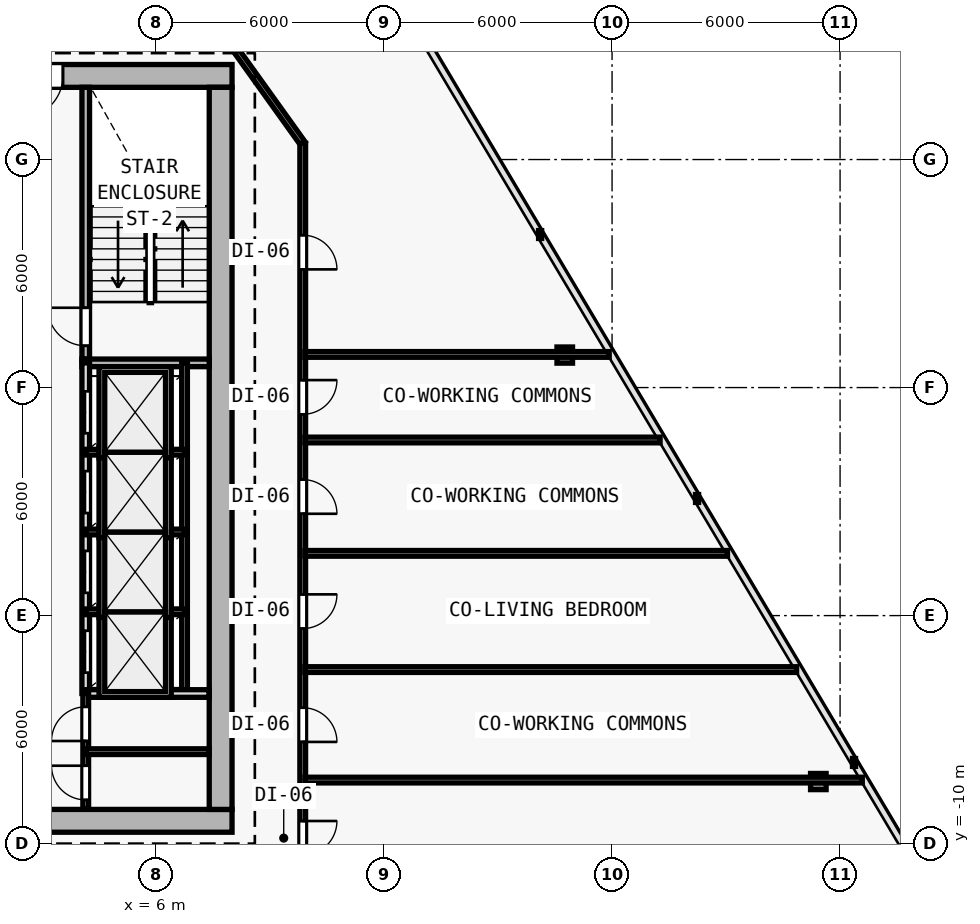
"""IFC4 building model, lengths in metres.
Left out: names, types, materials, properties, quantities, classifications, styles, units other than length and angle.
Written with IfcOpenShell. Run it as: python <this file> out.ifc"""

import sys

from ifc_helpers import new_model, si_unit, direction, frame, frame_2d, origin, origin_2d, place, context, subcontext, project, spatial, rectangle, i_section, extrude, element, fill, save


model = new_model("IFC4")
c1 = context("Model", 3, precision=1e-05, world=origin(), true_north=direction((0.0, 1.0)))
c2 = subcontext(c1, "Body", "Model", "MODEL_VIEW")
j1 = project(units=[si_unit("LENGTHUNIT", "METRE"), si_unit("PLANEANGLEUNIT", "RADIAN")], contexts=[c1])
p1 = place(None, origin())
s1 = spatial("IfcSite", under=j1, at=p1, CompositionType="ELEMENT")
p2 = place(p1, origin())
s2 = spatial("IfcBuilding", under=s1, at=p2, CompositionType="ELEMENT")
p3 = place(p2, frame((0.0, 0.0, 96.9)))
s3 = spatial("IfcBuildingStorey", under=s2, at=p3, CompositionType="ELEMENT", Elevation=96.9)
for number, where, z_axis, x_axis in (
    (1, (7.7, -9.4, 0.0), (0.0, 0.0, 1.0), (1.0, 0.0, 0.0)),
    (2, (7.7, 10.2, 0.0), (0.0, 0.0, 1.0), (1.0, 0.0, 0.0)),
    (3, (7.7, 0.4, 0.0), (0.0, 0.0, 1.0), (1.0, 0.0, 0.0)),
):
    element("IfcColumn", number, at=place(p3, frame(where, z_axis=z_axis, x_axis=x_axis)), inside=s3, PredefinedType="COLUMN", context=c2, shape_type="SweptSolid", body=[
        extrude(i_section(OverallWidth=0.409, OverallDepth=0.425, WebThickness=0.021, FlangeThickness=0.034, FilletRadius=0.015, at=origin_2d()), origin(), (0.0, 0.0, 1.0), 3.6),
    ])
p4 = place(p3, frame((23.428, -8.366, 0.006), z_axis=(-0.026107436898, 0.021620221181, 0.999425318758), x_axis=(-0.637813971185, -0.770190455771, 0.0)))
e4 = element("IfcColumn", 4, at=p4, inside=s3, PredefinedType="COLUMN", context=c2, shape_type="SweptSolid", body=[
    extrude(i_section(OverallWidth=0.409, OverallDepth=0.425, WebThickness=0.021, FlangeThickness=0.034, FilletRadius=0.015, at=origin_2d()), origin(), (0.0, 0.0, 1.0), 3.591),
])
p5 = place(p3, frame((16.755, 2.855, 0.006), z_axis=(-0.018907326549, 0.00952167524, 0.999775900241), x_axis=(-0.449781931574, -0.893138406984, 0.0)))
e5 = element("IfcColumn", 5, at=p5, inside=s3, PredefinedType="COLUMN", context=c2, shape_type="SweptSolid", body=[
    extrude(i_section(OverallWidth=0.409, OverallDepth=0.425, WebThickness=0.021, FlangeThickness=0.034, FilletRadius=0.015, at=origin_2d()), origin(), (0.0, 0.0, 1.0), 3.59),
])
p6 = place(p3, frame((-8.0, -9.4, 0.0), z_axis=(0.0, 0.0, 1.0), x_axis=(1.0, 0.0, 0.0)))
e6 = element("IfcWall", 6, at=p6, inside=s3, PredefinedType="SHEAR", context=c2, shape_type="SweptSolid", body=[
    extrude(rectangle(XDim=16.0, YDim=0.6, at=frame_2d((8.0, 0.0))), origin(), (0.0, 0.0, 1.0), 3.35),
])
p7 = place(p6, frame((9.65, 0.0, 0.0)))
e7 = element("IfcOpeningElement", 7, at=p7, cuts=e6, PredefinedType="OPENING", context=c2, shape_type="SweptSolid", body=[
    extrude(rectangle(XDim=1.5, YDim=2.2, at=frame_2d((0.75, 1.1))), frame((0.0, 0.31, 0.0), z_axis=(0.0, -1.0, 0.0), x_axis=(1.0, 0.0, 0.0)), (0.0, 0.0, 1.0), 0.62),
])
p8 = place(p3, frame((8.0, 10.2, 0.0), z_axis=(0.0, 0.0, 1.0), x_axis=(-1.0, 0.0, 0.0)))
e8 = element("IfcWall", 8, at=p8, inside=s3, PredefinedType="SHEAR", context=c2, shape_type="SweptSolid", body=[
    extrude(rectangle(XDim=16.0, YDim=0.6, at=frame_2d((8.0, 0.0))), origin(), (0.0, 0.0, 1.0), 3.35),
])
p9 = place(p8, frame((4.45, 0.0, 0.0)))
e9 = element("IfcOpeningElement", 9, at=p9, cuts=e8, PredefinedType="OPENING", context=c2, shape_type="SweptSolid", body=[
    extrude(rectangle(XDim=1.1, YDim=2.15, at=frame_2d((0.55, 1.075))), frame((0.0, 0.31, 0.0), z_axis=(0.0, -1.0, 0.0), x_axis=(1.0, 0.0, 0.0)), (0.0, 0.0, 1.0), 0.62),
])
p10 = place(p3, frame((7.7, 9.9, 0.0), z_axis=(0.0, 0.0, 1.0), x_axis=(0.0, -1.0, 0.0)))
e10 = element("IfcWall", 10, at=p10, inside=s3, PredefinedType="SHEAR", context=c2, shape_type="SweptSolid", body=[
    extrude(rectangle(XDim=19.0, YDim=0.6, at=frame_2d((9.5, 0.0))), origin(), (0.0, 0.0, 1.0), 3.35),
])
p11 = place(p3, frame((4.15, 2.75, 0.0), z_axis=(0.0, 0.0, 1.0), x_axis=(0.0, 1.0, 0.0)))
e11 = element("IfcWall", 11, at=p11, inside=s3, PredefinedType="SOLIDWALL", context=c2, shape_type="SweptSolid", body=[
    extrude(rectangle(XDim=7.15, YDim=0.2, at=frame_2d((3.575, 0.0))), origin(), (0.0, 0.0, 1.0), 3.35),
])
p12 = place(p11, frame((0.35, 0.0, 0.0)))
e12 = element("IfcOpeningElement", 12, at=p12, cuts=e11, PredefinedType="OPENING", context=c2, shape_type="SweptSolid", body=[
    extrude(rectangle(XDim=1.0, YDim=2.15, at=frame_2d((0.5, 1.075))), frame((0.0, 0.11, 0.0), z_axis=(0.0, -1.0, 0.0), x_axis=(1.0, 0.0, 0.0)), (0.0, 0.0, 1.0), 0.22),
])
p13 = place(p3, frame((4.05, 2.65, 0.0), z_axis=(0.0, 0.0, 1.0), x_axis=(1.0, 0.0, 0.0)))
e13 = element("IfcWall", 13, at=p13, inside=s3, PredefinedType="SOLIDWALL", context=c2, shape_type="SweptSolid", body=[
    extrude(rectangle(XDim=3.35, YDim=0.2, at=frame_2d((1.675, 0.0))), origin(), (0.0, 0.0, 1.0), 3.35),
])
p14 = place(p3, frame((4.15, -6.05, 0.0), z_axis=(0.0, 0.0, 1.0), x_axis=(0.0, 1.0, 0.0)))
e14 = element("IfcWall", 14, at=p14, inside=s3, PredefinedType="SOLIDWALL", context=c2, shape_type="SweptSolid", body=[
    extrude(rectangle(XDim=8.7, YDim=0.2, at=frame_2d((4.35, 0.0))), origin(), (0.0, 0.0, 1.0), 3.35),
])
p15 = place(p14, frame((0.55, 0.0, 0.0)))
e15 = element("IfcOpeningElement", 15, at=p15, cuts=e14, PredefinedType="OPENING", context=c2, shape_type="SweptSolid", body=[
    extrude(rectangle(XDim=1.1, YDim=2.15, at=frame_2d((0.55, 1.075))), frame((0.0, 0.11, 0.0), z_axis=(0.0, -1.0, 0.0), x_axis=(1.0, 0.0, 0.0)), (0.0, 0.0, 1.0), 0.22),
])
p16 = place(p14, frame((2.65, 0.0, 0.0)))
e16 = element("IfcOpeningElement", 16, at=p16, cuts=e14, PredefinedType="OPENING", context=c2, shape_type="SweptSolid", body=[
    extrude(rectangle(XDim=1.1, YDim=2.15, at=frame_2d((0.55, 1.075))), frame((0.0, 0.11, 0.0), z_axis=(0.0, -1.0, 0.0), x_axis=(1.0, 0.0, 0.0)), (0.0, 0.0, 1.0), 0.22),
])
p17 = place(p14, frame((4.75, 0.0, 0.0)))
e17 = element("IfcOpeningElement", 17, at=p17, cuts=e14, PredefinedType="OPENING", context=c2, shape_type="SweptSolid", body=[
    extrude(rectangle(XDim=1.1, YDim=2.15, at=frame_2d((0.55, 1.075))), frame((0.0, 0.11, 0.0), z_axis=(0.0, -1.0, 0.0), x_axis=(1.0, 0.0, 0.0)), (0.0, 0.0, 1.0), 0.22),
])
p18 = place(p14, frame((6.85, 0.0, 0.0)))
e18 = element("IfcOpeningElement", 18, at=p18, cuts=e14, PredefinedType="OPENING", context=c2, shape_type="SweptSolid", body=[
    extrude(rectangle(XDim=1.1, YDim=2.15, at=frame_2d((0.55, 1.075))), frame((0.0, 0.11, 0.0), z_axis=(0.0, -1.0, 0.0), x_axis=(1.0, 0.0, 0.0)), (0.0, 0.0, 1.0), 0.22),
])
p19 = place(p3, frame((6.75, -6.05, 0.0), z_axis=(0.0, 0.0, 1.0), x_axis=(0.0, 1.0, 0.0)))
e19 = element("IfcWall", 19, at=p19, inside=s3, PredefinedType="PARTITIONING", context=c2, shape_type="SweptSolid", body=[
    extrude(rectangle(XDim=8.7, YDim=0.15, at=frame_2d((4.35, 0.0))), origin(), (0.0, 0.0, 1.0), 3.35),
])
for number, where, z_axis, x_axis in (
    (20, (4.15, -3.9, 0.0), (0.0, 0.0, 1.0), (1.0, 0.0, 0.0)),
    (21, (4.15, -1.8, 0.0), (0.0, 0.0, 1.0), (1.0, 0.0, 0.0)),
    (22, (4.15, 0.3, 0.0), (0.0, 0.0, 1.0), (1.0, 0.0, 0.0)),
):
    element("IfcWall", number, at=place(p3, frame(where, z_axis=z_axis, x_axis=x_axis)), inside=s3, PredefinedType="PARTITIONING", context=c2, shape_type="SweptSolid", body=[
        extrude(rectangle(XDim=2.6, YDim=0.15, at=frame_2d((1.3, 0.0))), origin(), (0.0, 0.0, 1.0), 3.35),
    ])
p20 = place(p3, frame((4.15, -6.05, 0.0), z_axis=(0.0, 0.0, 1.0), x_axis=(1.0, 0.0, 0.0)))
e23 = element("IfcWall", 23, at=p20, inside=s3, PredefinedType="SOLIDWALL", context=c2, shape_type="SweptSolid", body=[
    extrude(rectangle(XDim=3.245, YDim=0.2, at=frame_2d((1.623, 0.0))), origin(), (0.0, 0.0, 1.0), 3.35),
])
p21 = place(p3, frame((4.15, -9.095, 0.0), z_axis=(0.0, 0.0, 1.0), x_axis=(0.0, 1.0, 0.0)))
e24 = element("IfcWall", 24, at=p21, inside=s3, PredefinedType="PARTITIONING", context=c2, shape_type="SweptSolid", body=[
    extrude(rectangle(XDim=3.045, YDim=0.15, at=frame_2d((1.522, 0.0))), origin(), (0.0, 0.0, 1.0), 3.35),
])
p22 = place(p21, frame((0.245, 0.0, 0.0)))
e25 = element("IfcOpeningElement", 25, at=p22, cuts=e24, PredefinedType="OPENING", context=c2, shape_type="SweptSolid", body=[
    extrude(rectangle(XDim=0.9, YDim=2.1, at=frame_2d((0.45, 1.05))), frame((0.0, 0.085, 0.0), z_axis=(0.0, -1.0, 0.0), x_axis=(1.0, 0.0, 0.0)), (0.0, 0.0, 1.0), 0.17),
])
p23 = place(p21, frame((1.795, 0.0, 0.0)))
e26 = element("IfcOpeningElement", 26, at=p23, cuts=e24, PredefinedType="OPENING", context=c2, shape_type="SweptSolid", body=[
    extrude(rectangle(XDim=0.9, YDim=2.1, at=frame_2d((0.45, 1.05))), frame((0.0, 0.085, 0.0), z_axis=(0.0, -1.0, 0.0), x_axis=(1.0, 0.0, 0.0)), (0.0, 0.0, 1.0), 0.17),
])
p24 = place(p3, frame((4.15, -7.58, 0.0), z_axis=(0.0, 0.0, 1.0), x_axis=(1.0, 0.0, 0.0)))
e27 = element("IfcWall", 27, at=p24, inside=s3, PredefinedType="PARTITIONING", context=c2, shape_type="SweptSolid", body=[
    extrude(rectangle(XDim=3.245, YDim=0.15, at=frame_2d((1.623, 0.0))), origin(), (0.0, 0.0, 1.0), 3.35),
])
p25 = place(p3, frame((7.041, 12.36, 0.0), z_axis=(0.0, 0.0, 1.0), x_axis=(0.582449511476, -0.812866881218, 0.0)))
e28 = element("IfcWall", 28, at=p25, inside=s3, PredefinedType="PARTITIONING", context=c2, shape_type="SweptSolid", body=[
    extrude(rectangle(XDim=4.84, YDim=0.15, at=frame_2d((2.42, 0.0))), origin(), (0.0, 0.0, 1.0), 2.925),
])
p26 = place(p3, frame((9.86, 8.426, 0.0), z_axis=(0.0, 0.0, 1.0), x_axis=(0.0, -1.0, 0.0)))
e29 = element("IfcWall", 29, at=p26, inside=s3, PredefinedType="PARTITIONING", context=c2, shape_type="SweptSolid", body=[
    extrude(rectangle(XDim=19.986, YDim=0.15, at=frame_2d((9.993, 0.0))), origin(), (0.0, 0.0, 1.0), 2.705),
])
p27 = place(p26, frame((17.83, 0.0, 0.0)))
e30 = element("IfcOpeningElement", 30, at=p27, cuts=e29, PredefinedType="OPENING", context=c2, shape_type="SweptSolid", body=[
    extrude(rectangle(XDim=0.9, YDim=2.1, at=frame_2d((0.45, 1.05))), frame((0.0, 0.085, 0.0), z_axis=(0.0, -1.0, 0.0), x_axis=(1.0, 0.0, 0.0)), (0.0, 0.0, 1.0), 0.17),
])
p28 = place(p26, frame((14.85, 0.0, 0.0)))
e31 = element("IfcOpeningElement", 31, at=p28, cuts=e29, PredefinedType="OPENING", context=c2, shape_type="SweptSolid", body=[
    extrude(rectangle(XDim=0.9, YDim=2.1, at=frame_2d((0.45, 1.05))), frame((0.0, 0.085, 0.0), z_axis=(0.0, -1.0, 0.0), x_axis=(1.0, 0.0, 0.0)), (0.0, 0.0, 1.0), 0.17),
])
p29 = place(p26, frame((11.867, 0.0, 0.0)))
e32 = element("IfcOpeningElement", 32, at=p29, cuts=e29, PredefinedType="OPENING", context=c2, shape_type="SweptSolid", body=[
    extrude(rectangle(XDim=0.9, YDim=2.1, at=frame_2d((0.45, 1.05))), frame((0.0, 0.085, 0.0), z_axis=(0.0, -1.0, 0.0), x_axis=(1.0, 0.0, 0.0)), (0.0, 0.0, 1.0), 0.17),
])
p30 = place(p26, frame((8.846, 0.0, 0.0)))
e33 = element("IfcOpeningElement", 33, at=p30, cuts=e29, PredefinedType="OPENING", context=c2, shape_type="SweptSolid", body=[
    extrude(rectangle(XDim=0.9, YDim=2.1, at=frame_2d((0.45, 1.05))), frame((0.0, 0.085, 0.0), z_axis=(0.0, -1.0, 0.0), x_axis=(1.0, 0.0, 0.0)), (0.0, 0.0, 1.0), 0.17),
])
p31 = place(p26, frame((6.229, 0.0, 0.0)))
e34 = element("IfcOpeningElement", 34, at=p31, cuts=e29, PredefinedType="OPENING", context=c2, shape_type="SweptSolid", body=[
    extrude(rectangle(XDim=0.9, YDim=2.1, at=frame_2d((0.45, 1.05))), frame((0.0, 0.085, 0.0), z_axis=(0.0, -1.0, 0.0), x_axis=(1.0, 0.0, 0.0)), (0.0, 0.0, 1.0), 0.17),
])
p32 = place(p26, frame((2.416, 0.0, 0.0)))
e35 = element("IfcOpeningElement", 35, at=p32, cuts=e29, PredefinedType="OPENING", context=c2, shape_type="SweptSolid", body=[
    extrude(rectangle(XDim=0.9, YDim=2.1, at=frame_2d((0.45, 1.05))), frame((0.0, 0.085, 0.0), z_axis=(0.0, -1.0, 0.0), x_axis=(1.0, 0.0, 0.0)), (0.0, 0.0, 1.0), 0.17),
])
p33 = place(p3, frame((9.92, -8.328, 0.0), z_axis=(0.0, 0.0, 1.0), x_axis=(1.0, 0.0, 0.0)))
e36 = element("IfcWall", 36, at=p33, inside=s3, PredefinedType="PARTITIONING", context=c2, shape_type="SweptSolid", body=[
    extrude(rectangle(XDim=14.664, YDim=0.15, at=frame_2d((7.332, 0.0))), origin(), (0.0, 0.0, 1.0), 2.705),
])
p34 = place(p3, frame((9.92, 2.872, 0.0), z_axis=(0.0, 0.0, 1.0), x_axis=(1.0, 0.0, 0.0)))
e37 = element("IfcWall", 37, at=p34, inside=s3, PredefinedType="PARTITIONING", context=c2, shape_type="SweptSolid", body=[
    extrude(rectangle(XDim=8.005, YDim=0.15, at=frame_2d((4.002, 0.0))), origin(), (0.0, 0.0, 1.0), 2.835),
])
p35 = place(p3, frame((9.92, -2.362, 0.0), z_axis=(0.0, 0.0, 1.0), x_axis=(1.0, 0.0, 0.0)))
e38 = element("IfcWall", 38, at=p35, inside=s3, PredefinedType="PARTITIONING", context=c2, shape_type="SweptSolid", body=[
    extrude(rectangle(XDim=11.117, YDim=0.15, at=frame_2d((5.559, 0.0))), origin(), (0.0, 0.0, 1.0), 2.835),
])
p36 = place(p3, frame((9.92, -5.42, 0.0), z_axis=(0.0, 0.0, 1.0), x_axis=(1.0, 0.0, 0.0)))
e39 = element("IfcWall", 39, at=p36, inside=s3, PredefinedType="PARTITIONING", context=c2, shape_type="SweptSolid", body=[
    extrude(rectangle(XDim=12.936, YDim=0.15, at=frame_2d((6.468, 0.0))), origin(), (0.0, 0.0, 1.0), 2.835),
])
p37 = place(p3, frame((9.92, 0.621, 0.0), z_axis=(0.0, 0.0, 1.0), x_axis=(1.0, 0.0, 0.0)))
e40 = element("IfcWall", 40, at=p37, inside=s3, PredefinedType="PARTITIONING", context=c2, shape_type="SweptSolid", body=[
    extrude(rectangle(XDim=9.344, YDim=0.15, at=frame_2d((4.672, 0.0))), origin(), (0.0, 0.0, 1.0), 2.835),
])
p38 = place(p9, origin())
e41 = element("IfcDoor", 41, at=p38, inside=s3, OperationType="SINGLE_SWING_RIGHT", PredefinedType="DOOR", context=c2, shape_type="SweptSolid", body=[
    extrude(rectangle(XDim=1.1, YDim=2.15, at=frame_2d((0.55, 1.075))), frame((0.0, 0.025, 0.0), z_axis=(0.0, -1.0, 0.0), x_axis=(1.0, 0.0, 0.0)), (0.0, 0.0, 1.0), 0.05),
])
fill(e9, e41)
p39 = place(p12, origin())
e42 = element("IfcDoor", 42, at=p39, inside=s3, OperationType="SINGLE_SWING_RIGHT", PredefinedType="DOOR", context=c2, shape_type="SweptSolid", body=[
    extrude(rectangle(XDim=1.0, YDim=2.15, at=frame_2d((0.5, 1.075))), frame((0.0, 0.025, 0.0), z_axis=(0.0, -1.0, 0.0), x_axis=(1.0, 0.0, 0.0)), (0.0, 0.0, 1.0), 0.05),
])
fill(e12, e42)
p40 = place(p15, origin())
e43 = element("IfcDoor", 43, at=p40, inside=s3, OperationType="DOUBLE_DOOR_SLIDING", PredefinedType="DOOR", context=c2, shape_type="SweptSolid", body=[
    extrude(rectangle(XDim=1.1, YDim=2.15, at=frame_2d((0.55, 1.075))), frame((0.0, 0.025, 0.0), z_axis=(0.0, -1.0, 0.0), x_axis=(1.0, 0.0, 0.0)), (0.0, 0.0, 1.0), 0.05),
])
fill(e15, e43)
p41 = place(p16, origin())
e44 = element("IfcDoor", 44, at=p41, inside=s3, OperationType="DOUBLE_DOOR_SLIDING", PredefinedType="DOOR", context=c2, shape_type="SweptSolid", body=[
    extrude(rectangle(XDim=1.1, YDim=2.15, at=frame_2d((0.55, 1.075))), frame((0.0, 0.025, 0.0), z_axis=(0.0, -1.0, 0.0), x_axis=(1.0, 0.0, 0.0)), (0.0, 0.0, 1.0), 0.05),
])
fill(e16, e44)
p42 = place(p17, origin())
e45 = element("IfcDoor", 45, at=p42, inside=s3, OperationType="DOUBLE_DOOR_SLIDING", PredefinedType="DOOR", context=c2, shape_type="SweptSolid", body=[
    extrude(rectangle(XDim=1.1, YDim=2.15, at=frame_2d((0.55, 1.075))), frame((0.0, 0.025, 0.0), z_axis=(0.0, -1.0, 0.0), x_axis=(1.0, 0.0, 0.0)), (0.0, 0.0, 1.0), 0.05),
])
fill(e17, e45)
p43 = place(p18, origin())
e46 = element("IfcDoor", 46, at=p43, inside=s3, OperationType="DOUBLE_DOOR_SLIDING", PredefinedType="DOOR", context=c2, shape_type="SweptSolid", body=[
    extrude(rectangle(XDim=1.1, YDim=2.15, at=frame_2d((0.55, 1.075))), frame((0.0, 0.025, 0.0), z_axis=(0.0, -1.0, 0.0), x_axis=(1.0, 0.0, 0.0)), (0.0, 0.0, 1.0), 0.05),
])
fill(e18, e46)
p44 = place(p22, origin())
e47 = element("IfcDoor", 47, at=p44, inside=s3, OperationType="SINGLE_SWING_RIGHT", PredefinedType="DOOR", context=c2, shape_type="SweptSolid", body=[
    extrude(rectangle(XDim=0.9, YDim=2.1, at=frame_2d((0.45, 1.05))), frame((0.0, 0.025, 0.0), z_axis=(0.0, -1.0, 0.0), x_axis=(1.0, 0.0, 0.0)), (0.0, 0.0, 1.0), 0.05),
])
fill(e25, e47)
p45 = place(p23, origin())
e48 = element("IfcDoor", 48, at=p45, inside=s3, OperationType="SINGLE_SWING_LEFT", PredefinedType="DOOR", context=c2, shape_type="SweptSolid", body=[
    extrude(rectangle(XDim=0.9, YDim=2.1, at=frame_2d((0.45, 1.05))), frame((0.0, 0.025, 0.0), z_axis=(0.0, -1.0, 0.0), x_axis=(1.0, 0.0, 0.0)), (0.0, 0.0, 1.0), 0.05),
])
fill(e26, e48)
p46 = place(p27, origin())
e49 = element("IfcDoor", 49, at=p46, inside=s3, OperationType="SINGLE_SWING_LEFT", PredefinedType="DOOR", context=c2, shape_type="SweptSolid", body=[
    extrude(rectangle(XDim=0.9, YDim=2.1, at=frame_2d((0.45, 1.05))), frame((0.0, 0.025, 0.0), z_axis=(0.0, -1.0, 0.0), x_axis=(1.0, 0.0, 0.0)), (0.0, 0.0, 1.0), 0.05),
])
fill(e30, e49)
p47 = place(p28, origin())
e50 = element("IfcDoor", 50, at=p47, inside=s3, OperationType="SINGLE_SWING_RIGHT", PredefinedType="DOOR", context=c2, shape_type="SweptSolid", body=[
    extrude(rectangle(XDim=0.9, YDim=2.1, at=frame_2d((0.45, 1.05))), frame((0.0, 0.025, 0.0), z_axis=(0.0, -1.0, 0.0), x_axis=(1.0, 0.0, 0.0)), (0.0, 0.0, 1.0), 0.05),
])
fill(e31, e50)
p48 = place(p29, origin())
e51 = element("IfcDoor", 51, at=p48, inside=s3, OperationType="SINGLE_SWING_LEFT", PredefinedType="DOOR", context=c2, shape_type="SweptSolid", body=[
    extrude(rectangle(XDim=0.9, YDim=2.1, at=frame_2d((0.45, 1.05))), frame((0.0, 0.025, 0.0), z_axis=(0.0, -1.0, 0.0), x_axis=(1.0, 0.0, 0.0)), (0.0, 0.0, 1.0), 0.05),
])
fill(e32, e51)
p49 = place(p30, origin())
e52 = element("IfcDoor", 52, at=p49, inside=s3, OperationType="SINGLE_SWING_RIGHT", PredefinedType="DOOR", context=c2, shape_type="SweptSolid", body=[
    extrude(rectangle(XDim=0.9, YDim=2.1, at=frame_2d((0.45, 1.05))), frame((0.0, 0.025, 0.0), z_axis=(0.0, -1.0, 0.0), x_axis=(1.0, 0.0, 0.0)), (0.0, 0.0, 1.0), 0.05),
])
fill(e33, e52)
p50 = place(p31, origin())
e53 = element("IfcDoor", 53, at=p50, inside=s3, OperationType="SINGLE_SWING_LEFT", PredefinedType="DOOR", context=c2, shape_type="SweptSolid", body=[
    extrude(rectangle(XDim=0.9, YDim=2.1, at=frame_2d((0.45, 1.05))), frame((0.0, 0.025, 0.0), z_axis=(0.0, -1.0, 0.0), x_axis=(1.0, 0.0, 0.0)), (0.0, 0.0, 1.0), 0.05),
])
fill(e34, e53)
p51 = place(p32, origin())
e54 = element("IfcDoor", 54, at=p51, inside=s3, OperationType="SINGLE_SWING_RIGHT", PredefinedType="DOOR", context=c2, shape_type="SweptSolid", body=[
    extrude(rectangle(XDim=0.9, YDim=2.1, at=frame_2d((0.45, 1.05))), frame((0.0, 0.025, 0.0), z_axis=(0.0, -1.0, 0.0), x_axis=(1.0, 0.0, 0.0)), (0.0, 0.0, 1.0), 0.05),
])
fill(e35, e54)
save(model, sys.argv[1])
